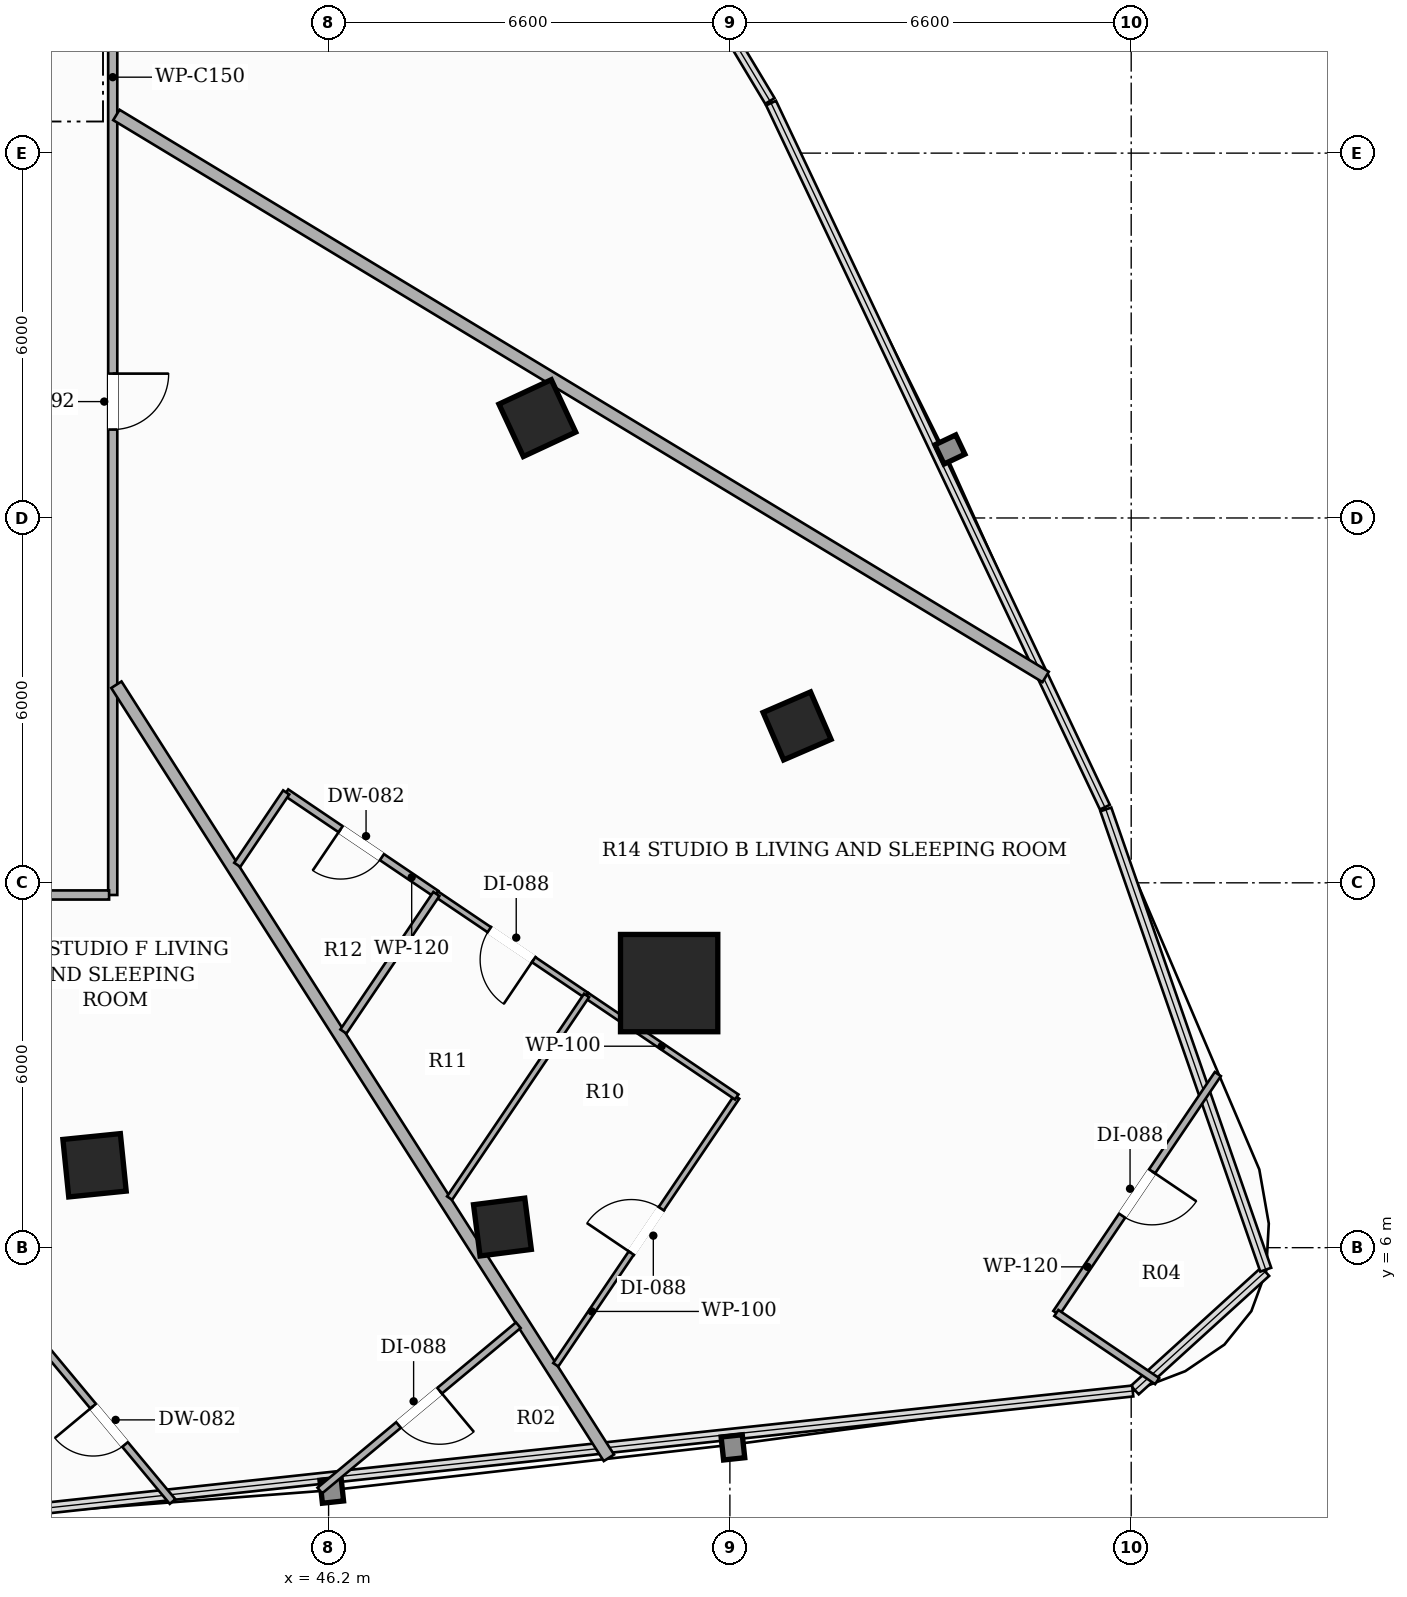
"""IFC4 building model, lengths in metres.
Left out: names, types, materials, properties, quantities, classifications, styles, units other than length and angle.
Written with IfcOpenShell. Run it as: python <this file> out.ifc"""

import sys

from ifc_helpers import new_model, si_unit, direction, frame, frame_2d, origin, origin_2d, place, context, subcontext, project, spatial, rectangle, hollow_rectangle, extrude, element, fill, save


model = new_model("IFC4")
c1 = context("Model", 3, precision=1e-05, world=origin(), true_north=direction((0.0, 1.0)))
c2 = subcontext(c1, "Body", "Model", "MODEL_VIEW")
j1 = project(units=[si_unit("LENGTHUNIT", "METRE"), si_unit("PLANEANGLEUNIT", "RADIAN")], contexts=[c1])
p1 = place(None, origin())
s1 = spatial("IfcSite", under=j1, at=p1, CompositionType="ELEMENT")
p2 = place(p1, origin())
s2 = spatial("IfcBuilding", under=s1, at=p2, CompositionType="ELEMENT")
p3 = place(p2, frame((0.0, 0.0, 43.4)))
s3 = spatial("IfcBuildingStorey", under=s2, at=p3, CompositionType="ELEMENT", Elevation=43.4)
p4 = place(p3, frame((51.801, 10.351, 0.0), z_axis=(0.0, 0.0, 1.0), x_axis=(1.0, 0.0, 0.0)))
e1 = element("IfcColumn", 1, at=p4, inside=s3, PredefinedType="COLUMN", context=c2, shape_type="SweptSolid", body=[
    extrude(hollow_rectangle(XDim=1.6, YDim=1.6, WallThickness=0.05, at=origin_2d()), origin(), (0.0, 0.0, 1.0), 3.3),
])
for number, where, z_axis, x_axis in (
    (2, (42.351, 7.355, 0.0), (0.0, 0.0, 1.0), (0.995, 0.101, 0.0)),
    (3, (49.633, 19.642, 0.0), (0.0, 0.0, 1.0), (-0.423, 0.906, 0.0)),
):
    element("IfcColumn", number, at=place(p3, frame(where, z_axis=z_axis, x_axis=x_axis)), inside=s3, PredefinedType="COLUMN", context=c2, shape_type="SweptSolid", body=[
        extrude(hollow_rectangle(XDim=0.95, YDim=0.95, WallThickness=0.032, at=origin_2d()), origin(), (0.0, 0.0, 1.0), 3.3),
    ])
for number, where, z_axis, x_axis in (
    (4, (49.059, 6.339, 0.0), (0.0, 0.0, 1.0), (0.992, 0.127, 0.0)),
    (5, (53.905, 14.58, 0.0), (0.0, 0.0, 1.0), (-0.397, 0.918, 0.0)),
):
    element("IfcColumn", number, at=place(p3, frame(where, z_axis=z_axis, x_axis=x_axis)), inside=s3, PredefinedType="COLUMN", context=c2, shape_type="SweptSolid", body=[
        extrude(hollow_rectangle(XDim=0.85, YDim=0.85, WallThickness=0.028, at=origin_2d()), origin(), (0.0, 0.0, 1.0), 3.3),
    ])
p5 = place(p3, frame((42.65, 36.84, 0.0), z_axis=(0.0, 0.0, 1.0), x_axis=(0.0, -1.0, 0.0)))
e6 = element("IfcWall", 6, at=p5, inside=s3, PredefinedType="PARTITIONING", context=c2, shape_type="SweptSolid", body=[
    extrude(rectangle(XDim=25.04, YDim=0.15, at=frame_2d((12.52, 0.0))), origin(), (0.0, 0.0, 1.0), 2.413),
])
p6 = place(p5, frame((16.466, 0.0, 0.0)))
e7 = element("IfcOpeningElement", 7, at=p6, cuts=e6, PredefinedType="OPENING", context=c2, shape_type="SweptSolid", body=[
    extrude(rectangle(XDim=0.92, YDim=2.15, at=frame_2d((0.46, 1.075))), frame((0.0, 0.085, 0.0), z_axis=(0.0, -1.0, 0.0), x_axis=(1.0, 0.0, 0.0)), (0.0, 0.0, 1.0), 0.17),
])
p7 = place(p5, frame((5.796, 0.0, 0.0)))
e8 = element("IfcOpeningElement", 8, at=p7, cuts=e6, PredefinedType="OPENING", context=c2, shape_type="SweptSolid", body=[
    extrude(rectangle(XDim=0.92, YDim=2.15, at=frame_2d((0.46, 1.075))), frame((0.0, 0.085, 0.0), z_axis=(0.0, -1.0, 0.0), x_axis=(1.0, 0.0, 0.0)), (0.0, 0.0, 1.0), 0.17),
])
p8 = place(p3, frame((42.59, 11.8, 0.0), z_axis=(0.0, 0.0, 1.0), x_axis=(-1.0, 0.0, 0.0)))
e9 = element("IfcWall", 9, at=p8, inside=s3, PredefinedType="PARTITIONING", context=c2, shape_type="SweptSolid", body=[
    extrude(rectangle(XDim=19.24, YDim=0.15, at=frame_2d((9.62, 0.0))), origin(), (0.0, 0.0, 1.0), 2.669),
])
p9 = place(p8, frame((10.508, 0.0, 0.0)))
e10 = element("IfcOpeningElement", 10, at=p9, cuts=e9, PredefinedType="OPENING", context=c2, shape_type="SweptSolid", body=[
    extrude(rectangle(XDim=0.88, YDim=2.1, at=frame_2d((0.44, 1.05))), frame((0.0, 0.085, 0.0), z_axis=(0.0, -1.0, 0.0), x_axis=(1.0, 0.0, 0.0)), (0.0, 0.0, 1.0), 0.17),
])
p10 = place(p8, frame((2.98, 0.0, 0.0)))
e11 = element("IfcOpeningElement", 11, at=p10, cuts=e9, PredefinedType="OPENING", context=c2, shape_type="SweptSolid", body=[
    extrude(rectangle(XDim=0.92, YDim=2.15, at=frame_2d((0.46, 1.075))), frame((0.0, 0.085, 0.0), z_axis=(0.0, -1.0, 0.0), x_axis=(1.0, 0.0, 0.0)), (0.0, 0.0, 1.0), 0.17),
])
p11 = place(p3, frame((42.71, 24.628, 0.0), z_axis=(0.0, 0.0, 1.0), x_axis=(0.85570509792, -0.517463801047, 0.0)))
e12 = element("IfcWall", 12, at=p11, inside=s3, PredefinedType="PARTITIONING", context=c2, shape_type="SweptSolid", body=[
    extrude(rectangle(XDim=17.86, YDim=0.2, at=frame_2d((8.93, 0.0))), origin(), (0.0, 0.0, 1.0), 2.413),
])
p12 = place(p3, frame((50.81, 2.544, 0.0), z_axis=(0.0, 0.0, 1.0), x_axis=(-0.537314491885, 0.843381963769, 0.0)))
e13 = element("IfcWall", 13, at=p12, inside=s3, PredefinedType="PARTITIONING", context=c2, shape_type="SweptSolid", body=[
    extrude(rectangle(XDim=15.075, YDim=0.2, at=frame_2d((7.538, 0.0))), origin(), (0.0, 0.0, 1.0), 2.413),
])
p13 = place(p3, frame((47.973, 11.817, 0.0), z_axis=(0.0, 0.0, 1.0), x_axis=(-0.82839181121, 0.560149093653, 0.0)))
e14 = element("IfcWall", 14, at=p13, inside=s3, PredefinedType="PARTITIONING", context=c2, shape_type="SweptSolid", body=[
    extrude(rectangle(XDim=2.982, YDim=0.12, at=frame_2d((1.491, 0.0))), origin(), (0.0, 0.0, 1.0), 2.669),
])
p14 = place(p13, frame((1.081, 0.0, 0.0)))
e15 = element("IfcOpeningElement", 15, at=p14, cuts=e14, PredefinedType="OPENING", context=c2, shape_type="SweptSolid", body=[
    extrude(rectangle(XDim=0.82, YDim=2.1, at=frame_2d((0.41, 1.05))), frame((0.0, 0.07, 0.0), z_axis=(0.0, -1.0, 0.0), x_axis=(1.0, 0.0, 0.0)), (0.0, 0.0, 1.0), 0.14),
])
p15 = place(p3, frame((45.503, 13.487, 0.0), z_axis=(0.0, 0.0, 1.0), x_axis=(-0.559901526605, -0.828559159328, 0.0)))
e16 = element("IfcWall", 16, at=p15, inside=s3, PredefinedType="PARTITIONING", context=c2, shape_type="SweptSolid", body=[
    extrude(rectangle(XDim=1.438, YDim=0.12, at=frame_2d((0.719, 0.0))), origin(), (0.0, 0.0, 1.0), 2.669),
])
p16 = place(p3, frame((60.825, 8.855, 0.0), z_axis=(0.0, 0.0, 1.0), x_axis=(-0.560046533867, -0.828461151716, 0.0)))
e17 = element("IfcWall", 17, at=p16, inside=s3, PredefinedType="PARTITIONING", context=c2, shape_type="SweptSolid", body=[
    extrude(rectangle(XDim=4.742, YDim=0.12, at=frame_2d((2.371, 0.0))), origin(), (0.0, 0.0, 1.0), 3.06),
])
p17 = place(p16, frame((1.931, 0.0, 0.0)))
e18 = element("IfcOpeningElement", 18, at=p17, cuts=e17, PredefinedType="OPENING", context=c2, shape_type="SweptSolid", body=[
    extrude(rectangle(XDim=0.88, YDim=2.1, at=frame_2d((0.44, 1.05))), frame((0.0, 0.07, 0.0), z_axis=(0.0, -1.0, 0.0), x_axis=(1.0, 0.0, 0.0)), (0.0, 0.0, 1.0), 0.14),
])
p18 = place(p3, frame((58.169, 4.926, 0.0), z_axis=(0.0, 0.0, 1.0), x_axis=(0.828391626579, -0.560149366699, 0.0)))
e19 = element("IfcWall", 19, at=p18, inside=s3, PredefinedType="PARTITIONING", context=c2, shape_type="SweptSolid", body=[
    extrude(rectangle(XDim=2.001, YDim=0.12, at=frame_2d((1.001, 0.0))), origin(), (0.0, 0.0, 1.0), 3.06),
])
p19 = place(p3, frame((49.936, 4.074, 0.0), z_axis=(0.0, 0.0, 1.0), x_axis=(0.560030395854, 0.828472060917, 0.0)))
e20 = element("IfcWall", 20, at=p19, inside=s3, PredefinedType="PARTITIONING", context=c2, shape_type="SweptSolid", body=[
    extrude(rectangle(XDim=5.316, YDim=0.1, at=frame_2d((2.658, 0.0))), origin(), (0.0, 0.0, 1.0), 3.06),
])
p20 = place(p19, frame((2.218, 0.0, 0.0)))
e21 = element("IfcOpeningElement", 21, at=p20, cuts=e20, PredefinedType="OPENING", context=c2, shape_type="SweptSolid", body=[
    extrude(rectangle(XDim=0.88, YDim=2.1, at=frame_2d((0.44, 1.05))), frame((0.0, 0.06, 0.0), z_axis=(0.0, -1.0, 0.0), x_axis=(1.0, 0.0, 0.0)), (0.0, 0.0, 1.0), 0.12),
])
p21 = place(p3, frame((52.913, 8.478, 0.0), z_axis=(0.0, 0.0, 1.0), x_axis=(-0.828429805787, 0.560092900226, 0.0)))
e22 = element("IfcWall", 22, at=p21, inside=s3, PredefinedType="PARTITIONING", context=c2, shape_type="SweptSolid", body=[
    extrude(rectangle(XDim=2.981, YDim=0.1, at=frame_2d((1.491, 0.0))), origin(), (0.0, 0.0, 1.0), 2.413),
])
p22 = place(p3, frame((50.443, 10.148, 0.0), z_axis=(0.0, 0.0, 1.0), x_axis=(-0.828607449923, 0.559830058082, 0.0)))
e23 = element("IfcWall", 23, at=p22, inside=s3, PredefinedType="PARTITIONING", context=c2, shape_type="SweptSolid", body=[
    extrude(rectangle(XDim=2.981, YDim=0.1, at=frame_2d((1.491, 0.0))), origin(), (0.0, 0.0, 1.0), 3.06),
])
p23 = place(p22, frame((1.051, 0.0, 0.0)))
e24 = element("IfcOpeningElement", 24, at=p23, cuts=e23, PredefinedType="OPENING", context=c2, shape_type="SweptSolid", body=[
    extrude(rectangle(XDim=0.88, YDim=2.1, at=frame_2d((0.44, 1.05))), frame((0.0, 0.06, 0.0), z_axis=(0.0, -1.0, 0.0), x_axis=(1.0, 0.0, 0.0)), (0.0, 0.0, 1.0), 0.12),
])
p24 = place(p3, frame((47.973, 11.817, 0.0), z_axis=(0.0, 0.0, 1.0), x_axis=(-0.559971898906, -0.828511600665, 0.0)))
e25 = element("IfcWall", 25, at=p24, inside=s3, PredefinedType="PARTITIONING", context=c2, shape_type="SweptSolid", body=[
    extrude(rectangle(XDim=2.73, YDim=0.12, at=frame_2d((1.365, 0.0))), origin(), (0.0, 0.0, 1.0), 2.669),
])
p25 = place(p3, frame((48.19, 6.815, 0.0), z_axis=(0.0, 0.0, 1.0), x_axis=(0.560052199206, 0.828457321873, 0.0)))
e26 = element("IfcWall", 26, at=p25, inside=s3, PredefinedType="PARTITIONING", context=c2, shape_type="SweptSolid", body=[
    extrude(rectangle(XDim=4.023, YDim=0.1, at=frame_2d((2.012, 0.0))), origin(), (0.0, 0.0, 1.0), 2.413),
])
p26 = place(p3, frame((43.634, 1.825, 0.0), z_axis=(0.0, 0.0, 1.0), x_axis=(-0.639911914418, 0.768448268777, 0.0)))
e27 = element("IfcWall", 27, at=p26, inside=s3, PredefinedType="PARTITIONING", context=c2, shape_type="SweptSolid", body=[
    extrude(rectangle(XDim=3.261, YDim=0.12, at=frame_2d((1.631, 0.0))), origin(), (0.0, 0.0, 1.0), 3.06),
])
p27 = place(p26, frame((1.221, 0.0, 0.0)))
e28 = element("IfcOpeningElement", 28, at=p27, cuts=e27, PredefinedType="OPENING", context=c2, shape_type="SweptSolid", body=[
    extrude(rectangle(XDim=0.82, YDim=2.1, at=frame_2d((0.41, 1.05))), frame((0.0, 0.07, 0.0), z_axis=(0.0, -1.0, 0.0), x_axis=(1.0, 0.0, 0.0)), (0.0, 0.0, 1.0), 0.14),
])
p28 = place(p3, frame((49.32, 4.725, 0.0), z_axis=(0.0, 0.0, 1.0), x_axis=(-0.768353158093, -0.640026112317, 0.0)))
e29 = element("IfcWall", 29, at=p28, inside=s3, PredefinedType="PARTITIONING", context=c2, shape_type="SweptSolid", body=[
    extrude(rectangle(XDim=4.248, YDim=0.12, at=frame_2d((2.124, 0.0))), origin(), (0.0, 0.0, 1.0), 3.06),
])
p29 = place(p28, frame((1.684, 0.0, 0.0)))
e30 = element("IfcOpeningElement", 30, at=p29, cuts=e29, PredefinedType="OPENING", context=c2, shape_type="SweptSolid", body=[
    extrude(rectangle(XDim=0.88, YDim=2.1, at=frame_2d((0.44, 1.05))), frame((0.0, 0.07, 0.0), z_axis=(0.0, -1.0, 0.0), x_axis=(1.0, 0.0, 0.0)), (0.0, 0.0, 1.0), 0.14),
])
p30 = place(p6, origin())
e31 = element("IfcDoor", 31, at=p30, inside=s3, OperationType="SINGLE_SWING_LEFT", PredefinedType="DOOR", context=c2, shape_type="SweptSolid", body=[
    extrude(rectangle(XDim=0.92, YDim=2.15, at=frame_2d((0.46, 1.075))), frame((0.0, 0.025, 0.0), z_axis=(0.0, -1.0, 0.0), x_axis=(1.0, 0.0, 0.0)), (0.0, 0.0, 1.0), 0.05),
])
fill(e7, e31)
p31 = place(p14, origin())
e32 = element("IfcDoor", 32, at=p31, inside=s3, OperationType="SINGLE_SWING_RIGHT", PredefinedType="DOOR", context=c2, shape_type="SweptSolid", body=[
    extrude(rectangle(XDim=0.82, YDim=2.1, at=frame_2d((0.41, 1.05))), frame((0.0, 0.025, 0.0), z_axis=(0.0, -1.0, 0.0), x_axis=(1.0, 0.0, 0.0)), (0.0, 0.0, 1.0), 0.05),
])
fill(e15, e32)
p32 = place(p17, origin())
e33 = element("IfcDoor", 33, at=p32, inside=s3, OperationType="SINGLE_SWING_LEFT", PredefinedType="DOOR", context=c2, shape_type="SweptSolid", body=[
    extrude(rectangle(XDim=0.88, YDim=2.1, at=frame_2d((0.44, 1.05))), frame((0.0, 0.025, 0.0), z_axis=(0.0, -1.0, 0.0), x_axis=(1.0, 0.0, 0.0)), (0.0, 0.0, 1.0), 0.05),
])
fill(e18, e33)
p33 = place(p20, origin())
e34 = element("IfcDoor", 34, at=p33, inside=s3, OperationType="SINGLE_SWING_LEFT", PredefinedType="DOOR", context=c2, shape_type="SweptSolid", body=[
    extrude(rectangle(XDim=0.88, YDim=2.1, at=frame_2d((0.44, 1.05))), frame((0.0, 0.025, 0.0), z_axis=(0.0, -1.0, 0.0), x_axis=(1.0, 0.0, 0.0)), (0.0, 0.0, 1.0), 0.05),
])
fill(e21, e34)
p34 = place(p23, origin())
e35 = element("IfcDoor", 35, at=p34, inside=s3, OperationType="SINGLE_SWING_LEFT", PredefinedType="DOOR", context=c2, shape_type="SweptSolid", body=[
    extrude(rectangle(XDim=0.88, YDim=2.1, at=frame_2d((0.44, 1.05))), frame((0.0, 0.025, 0.0), z_axis=(0.0, -1.0, 0.0), x_axis=(1.0, 0.0, 0.0)), (0.0, 0.0, 1.0), 0.05),
])
fill(e24, e35)
p35 = place(p27, origin())
e36 = element("IfcDoor", 36, at=p35, inside=s3, OperationType="SINGLE_SWING_RIGHT", PredefinedType="DOOR", context=c2, shape_type="SweptSolid", body=[
    extrude(rectangle(XDim=0.82, YDim=2.1, at=frame_2d((0.41, 1.05))), frame((0.0, 0.025, 0.0), z_axis=(0.0, -1.0, 0.0), x_axis=(1.0, 0.0, 0.0)), (0.0, 0.0, 1.0), 0.05),
])
fill(e28, e36)
p36 = place(p29, origin())
e37 = element("IfcDoor", 37, at=p36, inside=s3, OperationType="SINGLE_SWING_LEFT", PredefinedType="DOOR", context=c2, shape_type="SweptSolid", body=[
    extrude(rectangle(XDim=0.88, YDim=2.1, at=frame_2d((0.44, 1.05))), frame((0.0, 0.025, 0.0), z_axis=(0.0, -1.0, 0.0), x_axis=(1.0, 0.0, 0.0)), (0.0, 0.0, 1.0), 0.05),
])
fill(e30, e37)
save(model, sys.argv[1])
